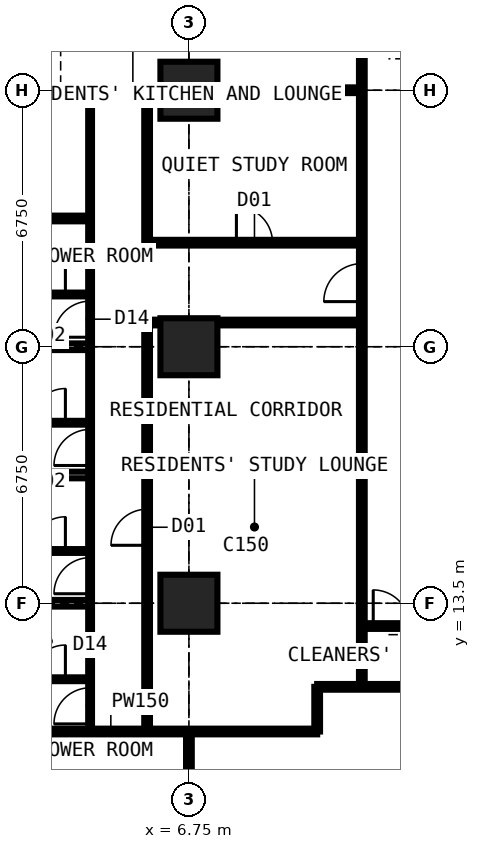
"""IFC4 building model, lengths in metres.
Left out: names, types, materials, properties, quantities, classifications, styles, units other than length and angle.
Written with IfcOpenShell. Run it as: python <this file> out.ifc"""

import sys

from ifc_helpers import new_model, si_unit, direction, frame, frame_2d, origin, origin_2d, place, context, subcontext, project, spatial, rectangle, extrude, element, fill, save


model = new_model("IFC4")
c1 = context("Model", 3, precision=1e-05, world=origin(), true_north=direction((0.0, 1.0)))
c2 = subcontext(c1, "Body", "Model", "MODEL_VIEW")
j1 = project(units=[si_unit("LENGTHUNIT", "METRE"), si_unit("PLANEANGLEUNIT", "RADIAN")], contexts=[c1])
p1 = place(None, origin())
s1 = spatial("IfcSite", under=j1, at=p1, CompositionType="ELEMENT")
p2 = place(p1, origin())
s2 = spatial("IfcBuilding", under=s1, at=p2, CompositionType="ELEMENT")
p3 = place(p2, frame((0.0, 0.0, 130.5)))
s3 = spatial("IfcBuildingStorey", under=s2, at=p3, CompositionType="ELEMENT", Elevation=130.5)
for number, where, z_axis, x_axis in (
    (1, (6.75, 13.5, 0.0), (0.0, 0.0, 1.0), (1.0, 0.0, 0.0)),
    (2, (6.75, 20.25, 0.0), (0.0, 0.0, 1.0), (1.0, 0.0, 0.0)),
    (3, (6.75, 27.0, 0.0), (0.0, 0.0, 1.0), (1.0, 0.0, 0.0)),
):
    element("IfcColumn", number, at=place(p3, frame(where, z_axis=z_axis, x_axis=x_axis)), inside=s3, PredefinedType="COLUMN", context=c2, shape_type="SweptSolid", body=[
        extrude(rectangle(XDim=1.5, YDim=1.5, at=origin_2d()), origin(), (0.0, 0.0, 1.0), 3.6),
    ])
p4 = place(p3, frame((-0.734, 10.125, 0.0), z_axis=(0.0, 0.0, 1.0), x_axis=(1.0, 0.0, 0.0)))
e4 = element("IfcWall", 4, at=p4, inside=s3, PredefinedType="PARTITIONING", context=c2, shape_type="SweptSolid", body=[
    extrude(rectangle(XDim=10.859, YDim=0.15, at=frame_2d((5.429, 0.0))), origin(), (0.0, 0.0, 1.0), 3.375),
])
p5 = place(p3, frame((-0.734, 13.5, 0.0), z_axis=(0.0, 0.0, 1.0), x_axis=(1.0, 0.0, 0.0)))
e5 = element("IfcWall", 5, at=p5, inside=s3, PredefinedType="PARTITIONING", context=c2, shape_type="SweptSolid", body=[
    extrude(rectangle(XDim=4.884, YDim=0.175, at=frame_2d((2.442, 0.0))), origin(), (0.0, 0.0, 1.0), 2.877),
])
p6 = place(p3, frame((-0.734, 16.875, 0.0), z_axis=(0.0, 0.0, 1.0), x_axis=(1.0, 0.0, 0.0)))
e6 = element("IfcWall", 6, at=p6, inside=s3, PredefinedType="PARTITIONING", context=c2, shape_type="SweptSolid", body=[
    extrude(rectangle(XDim=4.884, YDim=0.175, at=frame_2d((2.442, 0.0))), origin(), (0.0, 0.0, 1.0), 3.375),
])
p7 = place(p3, frame((-0.734, 20.25, 0.0), z_axis=(0.0, 0.0, 1.0), x_axis=(1.0, 0.0, 0.0)))
e7 = element("IfcWall", 7, at=p7, inside=s3, PredefinedType="PARTITIONING", context=c2, shape_type="SweptSolid", body=[
    extrude(rectangle(XDim=4.884, YDim=0.175, at=frame_2d((2.442, 0.0))), origin(), (0.0, 0.0, 1.0), 2.877),
])
p8 = place(p3, frame((-0.734, 23.625, 0.0), z_axis=(0.0, 0.0, 1.0), x_axis=(1.0, 0.0, 0.0)))
e8 = element("IfcWall", 8, at=p8, inside=s3, PredefinedType="PARTITIONING", context=c2, shape_type="SweptSolid", body=[
    extrude(rectangle(XDim=4.884, YDim=0.15, at=frame_2d((2.442, 0.0))), origin(), (0.0, 0.0, 1.0), 3.375),
])
p9 = place(p3, frame((1.95, 11.5, 0.0), z_axis=(0.0, 0.0, 1.0), x_axis=(1.0, 0.0, 0.0)))
e9 = element("IfcWall", 9, at=p9, inside=s3, PredefinedType="PARTITIONING", context=c2, shape_type="SweptSolid", body=[
    extrude(rectangle(XDim=2.2, YDim=0.1, at=frame_2d((1.1, 0.0))), origin(), (0.0, 0.0, 1.0), 3.375),
])
p10 = place(p9, frame((0.65, 0.0, 0.0)))
e10 = element("IfcOpeningElement", 10, at=p10, cuts=e9, PredefinedType="OPENING", context=c2, shape_type="SweptSolid", body=[
    extrude(rectangle(XDim=0.9, YDim=2.2, at=frame_2d((0.45, 1.1))), frame((0.0, 0.06, 0.0), z_axis=(0.0, -1.0, 0.0), x_axis=(1.0, 0.0, 0.0)), (0.0, 0.0, 1.0), 0.12),
])
p11 = place(p3, frame((1.95, 14.875, 0.0), z_axis=(0.0, 0.0, 1.0), x_axis=(1.0, 0.0, 0.0)))
e11 = element("IfcWall", 11, at=p11, inside=s3, PredefinedType="PARTITIONING", context=c2, shape_type="SweptSolid", body=[
    extrude(rectangle(XDim=2.2, YDim=0.1, at=frame_2d((1.1, 0.0))), origin(), (0.0, 0.0, 1.0), 3.375),
])
p12 = place(p11, frame((0.65, 0.0, 0.0)))
e12 = element("IfcOpeningElement", 12, at=p12, cuts=e11, PredefinedType="OPENING", context=c2, shape_type="SweptSolid", body=[
    extrude(rectangle(XDim=0.9, YDim=2.2, at=frame_2d((0.45, 1.1))), frame((0.0, 0.06, 0.0), z_axis=(0.0, -1.0, 0.0), x_axis=(1.0, 0.0, 0.0)), (0.0, 0.0, 1.0), 0.12),
])
p13 = place(p3, frame((1.95, 18.25, 0.0), z_axis=(0.0, 0.0, 1.0), x_axis=(1.0, 0.0, 0.0)))
e13 = element("IfcWall", 13, at=p13, inside=s3, PredefinedType="PARTITIONING", context=c2, shape_type="SweptSolid", body=[
    extrude(rectangle(XDim=2.2, YDim=0.1, at=frame_2d((1.1, 0.0))), origin(), (0.0, 0.0, 1.0), 3.375),
])
p14 = place(p13, frame((0.65, 0.0, 0.0)))
e14 = element("IfcOpeningElement", 14, at=p14, cuts=e13, PredefinedType="OPENING", context=c2, shape_type="SweptSolid", body=[
    extrude(rectangle(XDim=0.9, YDim=2.2, at=frame_2d((0.45, 1.1))), frame((0.0, 0.06, 0.0), z_axis=(0.0, -1.0, 0.0), x_axis=(1.0, 0.0, 0.0)), (0.0, 0.0, 1.0), 0.12),
])
p15 = place(p3, frame((1.95, 21.625, 0.0), z_axis=(0.0, 0.0, 1.0), x_axis=(1.0, 0.0, 0.0)))
e15 = element("IfcWall", 15, at=p15, inside=s3, PredefinedType="PARTITIONING", context=c2, shape_type="SweptSolid", body=[
    extrude(rectangle(XDim=2.2, YDim=0.1, at=frame_2d((1.1, 0.0))), origin(), (0.0, 0.0, 1.0), 3.375),
])
p16 = place(p15, frame((0.65, 0.0, 0.0)))
e16 = element("IfcOpeningElement", 16, at=p16, cuts=e15, PredefinedType="OPENING", context=c2, shape_type="SweptSolid", body=[
    extrude(rectangle(XDim=0.9, YDim=2.2, at=frame_2d((0.45, 1.1))), frame((0.0, 0.06, 0.0), z_axis=(0.0, -1.0, 0.0), x_axis=(1.0, 0.0, 0.0)), (0.0, 0.0, 1.0), 0.12),
])
p17 = place(p3, frame((4.15, 10.125, 0.0), z_axis=(0.0, 0.0, 1.0), x_axis=(0.0, 1.0, 0.0)))
e17 = element("IfcWall", 17, at=p17, inside=s3, PredefinedType="PARTITIONING", context=c2, shape_type="SweptSolid", body=[
    extrude(rectangle(XDim=16.875, YDim=0.1, at=frame_2d((8.438, 0.0))), origin(), (0.0, 0.0, 1.0), 3.375),
])
p18 = place(p17, frame((0.2, 0.0, 0.0)))
e18 = element("IfcOpeningElement", 18, at=p18, cuts=e17, PredefinedType="OPENING", context=c2, shape_type="SweptSolid", body=[
    extrude(rectangle(XDim=0.95, YDim=2.2, at=frame_2d((0.475, 1.1))), frame((0.0, 0.06, 0.0), z_axis=(0.0, -1.0, 0.0), x_axis=(1.0, 0.0, 0.0)), (0.0, 0.0, 1.0), 0.12),
])
p19 = place(p17, frame((3.625, 0.0, 0.0)))
e19 = element("IfcOpeningElement", 19, at=p19, cuts=e17, PredefinedType="OPENING", context=c2, shape_type="SweptSolid", body=[
    extrude(rectangle(XDim=0.95, YDim=2.2, at=frame_2d((0.475, 1.1))), frame((0.0, 0.06, 0.0), z_axis=(0.0, -1.0, 0.0), x_axis=(1.0, 0.0, 0.0)), (0.0, 0.0, 1.0), 0.12),
])
p20 = place(p17, frame((7.0, 0.0, 0.0)))
e20 = element("IfcOpeningElement", 20, at=p20, cuts=e17, PredefinedType="OPENING", context=c2, shape_type="SweptSolid", body=[
    extrude(rectangle(XDim=0.95, YDim=2.2, at=frame_2d((0.475, 1.1))), frame((0.0, 0.06, 0.0), z_axis=(0.0, -1.0, 0.0), x_axis=(1.0, 0.0, 0.0)), (0.0, 0.0, 1.0), 0.12),
])
p21 = place(p17, frame((10.375, 0.0, 0.0)))
e21 = element("IfcOpeningElement", 21, at=p21, cuts=e17, PredefinedType="OPENING", context=c2, shape_type="SweptSolid", body=[
    extrude(rectangle(XDim=0.95, YDim=2.2, at=frame_2d((0.475, 1.1))), frame((0.0, 0.06, 0.0), z_axis=(0.0, -1.0, 0.0), x_axis=(1.0, 0.0, 0.0)), (0.0, 0.0, 1.0), 0.12),
])
p22 = place(p3, frame((4.15, 27.0, 0.0), z_axis=(0.0, 0.0, 1.0), x_axis=(1.0, 0.0, 0.0)))
e22 = element("IfcWall", 22, at=p22, inside=s3, PredefinedType="PARTITIONING", context=c2, shape_type="SweptSolid", body=[
    extrude(rectangle(XDim=7.15, YDim=0.15, at=frame_2d((3.575, 0.0))), origin(), (0.0, 0.0, 1.0), 2.806),
])
p23 = place(p3, frame((5.65, 10.125, 0.0), z_axis=(0.0, 0.0, 1.0), x_axis=(0.0, 1.0, 0.0)))
e23 = element("IfcWall", 23, at=p23, inside=s3, PredefinedType="PARTITIONING", context=c2, shape_type="SweptSolid", body=[
    extrude(rectangle(XDim=10.762, YDim=0.15, at=frame_2d((5.381, 0.0))), origin(), (0.0, 0.0, 1.0), 3.375),
])
p24 = place(p23, frame((4.9, 0.0, 0.0)))
e24 = element("IfcOpeningElement", 24, at=p24, cuts=e23, PredefinedType="OPENING", context=c2, shape_type="SweptSolid", body=[
    extrude(rectangle(XDim=0.95, YDim=2.2, at=frame_2d((0.475, 1.1))), frame((0.0, 0.085, 0.0), z_axis=(0.0, -1.0, 0.0), x_axis=(1.0, 0.0, 0.0)), (0.0, 0.0, 1.0), 0.17),
])
p25 = place(p3, frame((5.65, 20.887, 0.0), z_axis=(0.0, 0.0, 1.0), x_axis=(1.0, 0.0, 0.0)))
e25 = element("IfcWall", 25, at=p25, inside=s3, PredefinedType="PARTITIONING", context=c2, shape_type="SweptSolid", body=[
    extrude(rectangle(XDim=5.65, YDim=0.15, at=frame_2d((2.825, 0.0))), origin(), (0.0, 0.0, 1.0), 3.375),
])
p26 = place(p3, frame((5.65, 22.988, 0.0), z_axis=(0.0, 0.0, 1.0), x_axis=(0.0, 1.0, 0.0)))
e26 = element("IfcWall", 26, at=p26, inside=s3, PredefinedType="PARTITIONING", context=c2, shape_type="SweptSolid", body=[
    extrude(rectangle(XDim=4.012, YDim=0.15, at=frame_2d((2.006, 0.0))), origin(), (0.0, 0.0, 1.0), 3.375),
])
p27 = place(p3, frame((5.65, 22.988, 0.0), z_axis=(0.0, 0.0, 1.0), x_axis=(1.0, 0.0, 0.0)))
e27 = element("IfcWall", 27, at=p27, inside=s3, PredefinedType="PARTITIONING", context=c2, shape_type="SweptSolid", body=[
    extrude(rectangle(XDim=5.65, YDim=0.15, at=frame_2d((2.825, 0.0))), origin(), (0.0, 0.0, 1.0), 3.375),
])
p28 = place(p27, frame((2.35, 0.0, 0.0)))
e28 = element("IfcOpeningElement", 28, at=p28, cuts=e27, PredefinedType="OPENING", context=c2, shape_type="SweptSolid", body=[
    extrude(rectangle(XDim=0.95, YDim=2.2, at=frame_2d((0.475, 1.1))), frame((0.0, 0.085, 0.0), z_axis=(0.0, -1.0, 0.0), x_axis=(1.0, 0.0, 0.0)), (0.0, 0.0, 1.0), 0.17),
])
p29 = place(p3, frame((6.75, 4.15, 0.0), z_axis=(0.0, 0.0, 1.0), x_axis=(0.0, 1.0, 0.0)))
e29 = element("IfcWall", 29, at=p29, inside=s3, PredefinedType="PARTITIONING", context=c2, shape_type="SweptSolid", body=[
    extrude(rectangle(XDim=5.975, YDim=0.15, at=frame_2d((2.988, 0.0))), origin(), (0.0, 0.0, 1.0), 2.877),
])
p30 = place(p3, frame((10.125, 10.125, 0.0), z_axis=(0.0, 0.0, 1.0), x_axis=(0.0, 1.0, 0.0)))
e30 = element("IfcWall", 30, at=p30, inside=s3, PredefinedType="PARTITIONING", context=c2, shape_type="SweptSolid", body=[
    extrude(rectangle(XDim=1.175, YDim=0.15, at=frame_2d((0.587, 0.0))), origin(), (0.0, 0.0, 1.0), 3.375),
])
p31 = place(p3, frame((10.125, 11.3, 0.0), z_axis=(0.0, 0.0, 1.0), x_axis=(1.0, 0.0, 0.0)))
e31 = element("IfcWall", 31, at=p31, inside=s3, PredefinedType="PARTITIONING", context=c2, shape_type="SweptSolid", body=[
    extrude(rectangle(XDim=20.675, YDim=0.15, at=frame_2d((10.337, 0.0))), origin(), (0.0, 0.0, 1.0), 3.375),
])
p32 = place(p31, frame((5.2, 0.0, 0.0)))
e32 = element("IfcOpeningElement", 32, at=p32, cuts=e31, PredefinedType="OPENING", context=c2, shape_type="SweptSolid", body=[
    extrude(rectangle(XDim=1.0, YDim=2.2, at=frame_2d((0.5, 1.1))), frame((0.0, 0.085, 0.0), z_axis=(0.0, -1.0, 0.0), x_axis=(1.0, 0.0, 0.0)), (0.0, 0.0, 1.0), 0.17),
])
p33 = place(p31, frame((11.312, 0.0, 0.0)))
e33 = element("IfcOpeningElement", 33, at=p33, cuts=e31, PredefinedType="OPENING", context=c2, shape_type="SweptSolid", body=[
    extrude(rectangle(XDim=1.0, YDim=2.2, at=frame_2d((0.5, 1.1))), frame((0.0, 0.085, 0.0), z_axis=(0.0, -1.0, 0.0), x_axis=(1.0, 0.0, 0.0)), (0.0, 0.0, 1.0), 0.17),
])
p34 = place(p31, frame((3.225, 0.0, 0.0)))
e34 = element("IfcOpeningElement", 34, at=p34, cuts=e31, PredefinedType="OPENING", context=c2, shape_type="SweptSolid", body=[
    extrude(rectangle(XDim=0.95, YDim=2.2, at=frame_2d((0.475, 1.1))), frame((0.0, 0.085, 0.0), z_axis=(0.0, -1.0, 0.0), x_axis=(1.0, 0.0, 0.0)), (0.0, 0.0, 1.0), 0.17),
])
p35 = place(p3, frame((11.3, 11.3, 0.0), z_axis=(0.0, 0.0, 1.0), x_axis=(0.0, 1.0, 0.0)))
e35 = element("IfcWall", 35, at=p35, inside=s3, PredefinedType="PARTITIONING", context=c2, shape_type="SweptSolid", body=[
    extrude(rectangle(XDim=19.3, YDim=0.15, at=frame_2d((9.65, 0.0))), origin(), (0.0, 0.0, 1.0), 3.375),
])
p36 = place(p35, frame((18.1, 0.0, 0.0)))
e36 = element("IfcOpeningElement", 36, at=p36, cuts=e35, PredefinedType="OPENING", context=c2, shape_type="SweptSolid", body=[
    extrude(rectangle(XDim=1.0, YDim=2.2, at=frame_2d((0.5, 1.1))), frame((0.0, 0.085, 0.0), z_axis=(0.0, -1.0, 0.0), x_axis=(1.0, 0.0, 0.0)), (0.0, 0.0, 1.0), 0.17),
])
p37 = place(p35, frame((10.137, 0.0, 0.0)))
e37 = element("IfcOpeningElement", 37, at=p37, cuts=e35, PredefinedType="OPENING", context=c2, shape_type="SweptSolid", body=[
    extrude(rectangle(XDim=1.0, YDim=2.2, at=frame_2d((0.5, 1.1))), frame((0.0, 0.085, 0.0), z_axis=(0.0, -1.0, 0.0), x_axis=(1.0, 0.0, 0.0)), (0.0, 0.0, 1.0), 0.17),
])
p38 = place(p3, frame((11.3, 12.9, 0.0), z_axis=(0.0, 0.0, 1.0), x_axis=(1.0, 0.0, 0.0)))
e38 = element("IfcWall", 38, at=p38, inside=s3, PredefinedType="PARTITIONING", context=c2, shape_type="SweptSolid", body=[
    extrude(rectangle(XDim=1.6, YDim=0.15, at=frame_2d((0.8, 0.0))), origin(), (0.0, 0.0, 1.0), 2.806),
])
p39 = place(p38, frame((0.3, 0.0, 0.0)))
e39 = element("IfcOpeningElement", 39, at=p39, cuts=e38, PredefinedType="OPENING", context=c2, shape_type="SweptSolid", body=[
    extrude(rectangle(XDim=0.95, YDim=2.2, at=frame_2d((0.475, 1.1))), frame((0.0, 0.085, 0.0), z_axis=(0.0, -1.0, 0.0), x_axis=(1.0, 0.0, 0.0)), (0.0, 0.0, 1.0), 0.17),
])
p40 = place(p39, origin())
e40 = element("IfcDoor", 40, at=p40, inside=s3, OperationType="SINGLE_SWING_LEFT", PredefinedType="DOOR", context=c2, shape_type="SweptSolid", body=[
    extrude(rectangle(XDim=0.95, YDim=2.2, at=frame_2d((0.475, 1.1))), frame((0.0, 0.025, 0.0), z_axis=(0.0, -1.0, 0.0), x_axis=(1.0, 0.0, 0.0)), (0.0, 0.0, 1.0), 0.05),
])
fill(e39, e40)
p41 = place(p18, origin())
e41 = element("IfcDoor", 41, at=p41, inside=s3, OperationType="SINGLE_SWING_LEFT", PredefinedType="DOOR", context=c2, shape_type="SweptSolid", body=[
    extrude(rectangle(XDim=0.95, YDim=2.2, at=frame_2d((0.475, 1.1))), frame((0.0, 0.025, 0.0), z_axis=(0.0, -1.0, 0.0), x_axis=(1.0, 0.0, 0.0)), (0.0, 0.0, 1.0), 0.05),
])
fill(e18, e41)
p42 = place(p10, origin())
e42 = element("IfcDoor", 42, at=p42, inside=s3, OperationType="SINGLE_SWING_RIGHT", PredefinedType="DOOR", context=c2, shape_type="SweptSolid", body=[
    extrude(rectangle(XDim=0.9, YDim=2.2, at=frame_2d((0.45, 1.1))), frame((0.0, 0.025, 0.0), z_axis=(0.0, -1.0, 0.0), x_axis=(1.0, 0.0, 0.0)), (0.0, 0.0, 1.0), 0.05),
])
fill(e10, e42)
p43 = place(p19, origin())
e43 = element("IfcDoor", 43, at=p43, inside=s3, OperationType="SINGLE_SWING_LEFT", PredefinedType="DOOR", context=c2, shape_type="SweptSolid", body=[
    extrude(rectangle(XDim=0.95, YDim=2.2, at=frame_2d((0.475, 1.1))), frame((0.0, 0.025, 0.0), z_axis=(0.0, -1.0, 0.0), x_axis=(1.0, 0.0, 0.0)), (0.0, 0.0, 1.0), 0.05),
])
fill(e19, e43)
p44 = place(p12, origin())
e44 = element("IfcDoor", 44, at=p44, inside=s3, OperationType="SINGLE_SWING_RIGHT", PredefinedType="DOOR", context=c2, shape_type="SweptSolid", body=[
    extrude(rectangle(XDim=0.9, YDim=2.2, at=frame_2d((0.45, 1.1))), frame((0.0, 0.025, 0.0), z_axis=(0.0, -1.0, 0.0), x_axis=(1.0, 0.0, 0.0)), (0.0, 0.0, 1.0), 0.05),
])
fill(e12, e44)
p45 = place(p20, origin())
e45 = element("IfcDoor", 45, at=p45, inside=s3, OperationType="SINGLE_SWING_LEFT", PredefinedType="DOOR", context=c2, shape_type="SweptSolid", body=[
    extrude(rectangle(XDim=0.95, YDim=2.2, at=frame_2d((0.475, 1.1))), frame((0.0, 0.025, 0.0), z_axis=(0.0, -1.0, 0.0), x_axis=(1.0, 0.0, 0.0)), (0.0, 0.0, 1.0), 0.05),
])
fill(e20, e45)
p46 = place(p14, origin())
e46 = element("IfcDoor", 46, at=p46, inside=s3, OperationType="SINGLE_SWING_RIGHT", PredefinedType="DOOR", context=c2, shape_type="SweptSolid", body=[
    extrude(rectangle(XDim=0.9, YDim=2.2, at=frame_2d((0.45, 1.1))), frame((0.0, 0.025, 0.0), z_axis=(0.0, -1.0, 0.0), x_axis=(1.0, 0.0, 0.0)), (0.0, 0.0, 1.0), 0.05),
])
fill(e14, e46)
p47 = place(p21, origin())
e47 = element("IfcDoor", 47, at=p47, inside=s3, OperationType="SINGLE_SWING_LEFT", PredefinedType="DOOR", context=c2, shape_type="SweptSolid", body=[
    extrude(rectangle(XDim=0.95, YDim=2.2, at=frame_2d((0.475, 1.1))), frame((0.0, 0.025, 0.0), z_axis=(0.0, -1.0, 0.0), x_axis=(1.0, 0.0, 0.0)), (0.0, 0.0, 1.0), 0.05),
])
fill(e21, e47)
p48 = place(p16, origin())
e48 = element("IfcDoor", 48, at=p48, inside=s3, OperationType="SINGLE_SWING_RIGHT", PredefinedType="DOOR", context=c2, shape_type="SweptSolid", body=[
    extrude(rectangle(XDim=0.9, YDim=2.2, at=frame_2d((0.45, 1.1))), frame((0.0, 0.025, 0.0), z_axis=(0.0, -1.0, 0.0), x_axis=(1.0, 0.0, 0.0)), (0.0, 0.0, 1.0), 0.05),
])
fill(e16, e48)
p49 = place(p37, origin())
e49 = element("IfcDoor", 49, at=p49, inside=s3, OperationType="SINGLE_SWING_LEFT", PredefinedType="DOOR", context=c2, shape_type="SweptSolid", body=[
    extrude(rectangle(XDim=1.0, YDim=2.2, at=frame_2d((0.5, 1.1))), frame((0.0, 0.025, 0.0), z_axis=(0.0, -1.0, 0.0), x_axis=(1.0, 0.0, 0.0)), (0.0, 0.0, 1.0), 0.05),
])
fill(e37, e49)
p50 = place(p24, origin())
e50 = element("IfcDoor", 50, at=p50, inside=s3, OperationType="SINGLE_SWING_LEFT", PredefinedType="DOOR", context=c2, shape_type="SweptSolid", body=[
    extrude(rectangle(XDim=0.95, YDim=2.2, at=frame_2d((0.475, 1.1))), frame((0.0, 0.025, 0.0), z_axis=(0.0, -1.0, 0.0), x_axis=(1.0, 0.0, 0.0)), (0.0, 0.0, 1.0), 0.05),
])
fill(e24, e50)
p51 = place(p28, origin())
e51 = element("IfcDoor", 51, at=p51, inside=s3, OperationType="SINGLE_SWING_LEFT", PredefinedType="DOOR", context=c2, shape_type="SweptSolid", body=[
    extrude(rectangle(XDim=0.95, YDim=2.2, at=frame_2d((0.475, 1.1))), frame((0.0, 0.025, 0.0), z_axis=(0.0, -1.0, 0.0), x_axis=(1.0, 0.0, 0.0)), (0.0, 0.0, 1.0), 0.05),
])
fill(e28, e51)
save(model, sys.argv[1])
